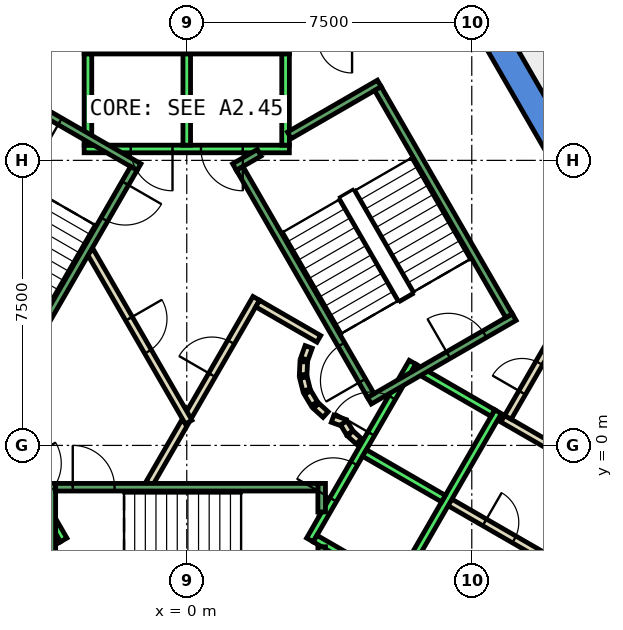
"""IFC4 building model, lengths in metres.
Left out: names, types, materials, properties, quantities, classifications, styles, units other than length and angle.
Written with IfcOpenShell. Run it as: python <this file> out.ifc"""

import sys

from ifc_helpers import new_model, si_unit, direction, frame, frame_2d, origin, place, context, subcontext, project, spatial, polyline, rectangle, outline, extrude, element, fill, save


model = new_model("IFC4")
c1 = context("Model", 3, precision=1e-05, world=origin(), true_north=direction((0.0, 1.0)))
c2 = subcontext(c1, "Body", "Model", "MODEL_VIEW")
j1 = project(units=[si_unit("LENGTHUNIT", "METRE"), si_unit("PLANEANGLEUNIT", "RADIAN")], contexts=[c1])
p1 = place(None, origin())
s1 = spatial("IfcSite", under=j1, at=p1, CompositionType="ELEMENT")
p2 = place(p1, origin())
s2 = spatial("IfcBuilding", under=s1, at=p2, CompositionType="ELEMENT")
p3 = place(p2, frame((0.0, 0.0, 219.2)))
s3 = spatial("IfcBuildingStorey", under=s2, at=p3, CompositionType="ELEMENT", Elevation=219.2)
p4 = place(p3, frame((0.0, 0.0, -0.4)))
e1 = element("IfcWall", 1, at=p4, inside=s3, PredefinedType="SHEAR", context=c2, shape_type="SweptSolid", body=[
    extrude(outline(polyline([(8.084, 11.498), (7.478, 11.148), (12.471, 2.5), (13.279, 2.5), (8.084, 11.498)])), origin(), (0.0, 0.0, 1.0), 4.2),
])
p5 = place(p3, frame((0.0, 0.0, -0.4)))
e2 = element("IfcWall", 2, at=p5, inside=s3, PredefinedType="SHEAR", context=c2, shape_type="SweptSolid", body=[
    extrude(outline(polyline([(6.64, -9.0), (13.279, 2.5), (12.471, 2.5), (6.235, -8.3), (6.64, -9.0)])), origin(), (0.0, 0.0, 1.0), 4.2),
])
p6 = place(p3, frame((6.841, -1.451, 0.0), z_axis=(0.0, 0.0, 1.0), x_axis=(0.866220623736, -0.499661716578, 0.0)))
e3 = element("IfcWall", 3, at=p6, inside=s3, PredefinedType="PARTITIONING", context=c2, shape_type="SweptSolid", body=[
    extrude(rectangle(XDim=2.9, YDim=0.2, at=frame_2d((1.45, 0.0))), origin(), (0.0, 0.0, 1.0), 3.8),
])
p7 = place(p6, frame((1.15, 0.0, 0.0)))
e4 = element("IfcOpeningElement", 4, at=p7, cuts=e3, PredefinedType="OPENING", context=c2, shape_type="SweptSolid", body=[
    extrude(rectangle(XDim=0.9, YDim=2.1, at=frame_2d((0.45, 1.05))), frame((0.0, 0.11, 0.0), z_axis=(0.0, -1.0, 0.0), x_axis=(1.0, 0.0, 0.0)), (0.0, 0.0, 1.0), 0.22),
])
p8 = place(p3, frame((10.653, -0.648, 0.0), z_axis=(0.0, 0.0, 1.0), x_axis=(-0.866036505625, 0.499980770555, 0.0)))
e5 = element("IfcWall", 5, at=p8, inside=s3, PredefinedType="PARTITIONING", context=c2, shape_type="SweptSolid", body=[
    extrude(rectangle(XDim=2.7, YDim=0.2, at=frame_2d((1.35, 0.0))), origin(), (0.0, 0.0, 1.0), 3.8),
])
p9 = place(p3, frame((8.451, 0.738, 0.0), z_axis=(0.0, 0.0, 1.0), x_axis=(0.499913221443, 0.866075499611, 0.0)))
e6 = element("IfcWall", 6, at=p9, inside=s3, PredefinedType="PARTITIONING", context=c2, shape_type="SweptSolid", body=[
    extrude(rectangle(XDim=2.4, YDim=0.2, at=frame_2d((1.2, 0.0))), origin(), (0.0, 0.0, 1.0), 3.8),
])
p10 = place(p9, frame((0.75, 0.0, 0.0)))
e7 = element("IfcOpeningElement", 7, at=p10, cuts=e6, PredefinedType="OPENING", context=c2, shape_type="SweptSolid", body=[
    extrude(rectangle(XDim=0.9, YDim=2.1, at=frame_2d((0.45, 1.05))), frame((0.0, 0.11, 0.0), z_axis=(0.0, -1.0, 0.0), x_axis=(1.0, 0.0, 0.0)), (0.0, 0.0, 1.0), 0.22),
])
p11 = place(p3, frame((-0.982, -1.0, 0.0), z_axis=(0.0, 0.0, 1.0), x_axis=(0.50024047865, 0.865886518847, 0.0)))
e8 = element("IfcWall", 8, at=p11, inside=s3, PredefinedType="PARTITIONING", context=c2, shape_type="SweptSolid", body=[
    extrude(rectangle(XDim=1.863, YDim=0.2, at=frame_2d((0.931, 0.0))), origin(), (0.0, 0.0, 1.0), 3.8),
])
p12 = place(p3, frame((0.05, 0.787, 0.0), z_axis=(0.0, 0.0, 1.0), x_axis=(0.499954076797, 0.866051915934, 0.0)))
e9 = element("IfcWall", 9, at=p12, inside=s3, PredefinedType="PARTITIONING", context=c2, shape_type="SweptSolid", body=[
    extrude(rectangle(XDim=3.558, YDim=0.2, at=frame_2d((1.779, 0.0))), origin(), (0.0, 0.0, 1.0), 3.8),
])
p13 = place(p12, frame((1.229, 0.0, 0.0)))
e10 = element("IfcOpeningElement", 10, at=p13, cuts=e9, PredefinedType="OPENING", context=c2, shape_type="SweptSolid", body=[
    extrude(rectangle(XDim=1.0, YDim=2.1, at=frame_2d((0.5, 1.05))), frame((0.0, 0.11, 0.0), z_axis=(0.0, -1.0, 0.0), x_axis=(1.0, 0.0, 0.0)), (0.0, 0.0, 1.0), 0.22),
])
p14 = place(p3, frame((1.866, 3.732, 0.0), z_axis=(0.0, 0.0, 1.0), x_axis=(0.866043361281, -0.499968895414, 0.0)))
e11 = element("IfcWall", 11, at=p14, inside=s3, PredefinedType="PARTITIONING", context=c2, shape_type="SweptSolid", body=[
    extrude(rectangle(XDim=1.858, YDim=0.2, at=frame_2d((0.929, 0.0))), origin(), (0.0, 0.0, 1.0), 3.8),
])
p15 = place(p3, frame((3.208, 2.592, 0.0), z_axis=(0.0, 0.0, 1.0), x_axis=(-0.337388820924, -0.941365382578, 0.0)))
e12 = element("IfcWall", 12, at=p15, inside=s3, PredefinedType="PARTITIONING", context=c2, shape_type="SweptSolid", body=[
    extrude(rectangle(XDim=0.338, YDim=0.2, at=frame_2d((0.169, 0.0))), origin(), (0.0, 0.0, 1.0), 3.8),
])
p16 = place(p3, frame((3.079, 2.199, 0.0), z_axis=(0.0, 0.0, 1.0), x_axis=(-0.047771483479, -0.998858290933, 0.0)))
e13 = element("IfcWall", 13, at=p16, inside=s3, PredefinedType="PARTITIONING", context=c2, shape_type="SweptSolid", body=[
    extrude(rectangle(XDim=0.337, YDim=0.2, at=frame_2d((0.169, 0.0))), origin(), (0.0, 0.0, 1.0), 3.8),
])
p17 = place(p3, frame((3.07, 1.786, 0.0), z_axis=(0.0, 0.0, 1.0), x_axis=(0.242705583207, -0.970099994784, 0.0)))
e14 = element("IfcWall", 14, at=p17, inside=s3, PredefinedType="PARTITIONING", context=c2, shape_type="SweptSolid", body=[
    extrude(rectangle(XDim=0.338, YDim=0.2, at=frame_2d((0.169, 0.0))), origin(), (0.0, 0.0, 1.0), 3.8),
])
for number, where, z_axis, x_axis in (
    (15, (3.182, 1.388, 0.0), (0.0, 0.0, 1.0), (0.512, -0.859, 0.0)),
    (16, (3.404, 1.039, 0.0), (0.0, 0.0, 1.0), (0.74, -0.672, 0.0)),
):
    element("IfcWall", number, at=place(p3, frame(where, z_axis=z_axis, x_axis=x_axis)), inside=s3, PredefinedType="PARTITIONING", context=c2, shape_type="SweptSolid", body=[
        extrude(rectangle(XDim=0.338, YDim=0.2, at=frame_2d((0.169, 0.0))), origin(), (0.0, 0.0, 1.0), 3.8),
    ])
p18 = place(p3, frame((3.838, 0.702, 0.0), z_axis=(0.0, 0.0, 1.0), x_axis=(0.941035081519, -0.338308993895, 0.0)))
e17 = element("IfcWall", 17, at=p18, inside=s3, PredefinedType="PARTITIONING", context=c2, shape_type="SweptSolid", body=[
    extrude(rectangle(XDim=0.337, YDim=0.2, at=frame_2d((0.168, 0.0))), origin(), (0.0, 0.0, 1.0), 3.8),
])
p19 = place(p3, frame((4.132, 0.593, 0.0), z_axis=(0.0, 0.0, 1.0), x_axis=(0.513561617048, -0.858052717201, 0.0)))
e18 = element("IfcWall", 18, at=p19, inside=s3, PredefinedType="PARTITIONING", context=c2, shape_type="SweptSolid", body=[
    extrude(rectangle(XDim=0.308, YDim=0.2, at=frame_2d((0.154, 0.0))), origin(), (0.0, 0.0, 1.0), 3.8),
])
p20 = place(p3, frame((4.301, 0.315, 0.0), z_axis=(0.0, 0.0, 1.0), x_axis=(0.741798017506, -0.670623367639, 0.0)))
e19 = element("IfcWall", 19, at=p20, inside=s3, PredefinedType="PARTITIONING", context=c2, shape_type="SweptSolid", body=[
    extrude(rectangle(XDim=0.309, YDim=0.2, at=frame_2d((0.154, 0.0))), origin(), (0.0, 0.0, 1.0), 3.8),
])
p21 = place(p3, frame((-2.54, 5.1, 0.0), z_axis=(0.0, 0.0, 1.0), x_axis=(0.499925051871, -0.866068670783, 0.0)))
e20 = element("IfcWall", 20, at=p21, inside=s3, PredefinedType="PARTITIONING", context=c2, shape_type="SweptSolid", body=[
    extrude(rectangle(XDim=5.181, YDim=0.2, at=frame_2d((2.59, 0.0))), origin(), (0.0, 0.0, 1.0), 3.8),
])
p22 = place(p21, frame((2.04, 0.0, 0.0)))
e21 = element("IfcOpeningElement", 21, at=p22, cuts=e20, PredefinedType="OPENING", context=c2, shape_type="SweptSolid", body=[
    extrude(rectangle(XDim=1.0, YDim=2.1, at=frame_2d((0.5, 1.05))), frame((0.0, 0.11, 0.0), z_axis=(0.0, -1.0, 0.0), x_axis=(1.0, 0.0, 0.0)), (0.0, 0.0, 1.0), 0.22),
])
p23 = place(p3, frame((2.7, 7.8, 0.0), z_axis=(0.0, 0.0, 1.0), x_axis=(-1.0, 0.0, 0.0)))
e22 = element("IfcWall", 22, at=p23, inside=s3, PredefinedType="STANDARD", context=c2, shape_type="SweptSolid", body=[
    extrude(rectangle(XDim=5.4, YDim=0.2, at=frame_2d((2.7, 0.0))), origin(), (0.0, 0.0, 1.0), 3.8),
])
p24 = place(p23, frame((1.225, 0.0, 0.0)))
e23 = element("IfcOpeningElement", 23, at=p24, cuts=e22, PredefinedType="OPENING", context=c2, shape_type="SweptSolid", body=[
    extrude(rectangle(XDim=1.1, YDim=2.1, at=frame_2d((0.55, 1.05))), frame((0.0, 0.11, 0.0), z_axis=(0.0, -1.0, 0.0), x_axis=(1.0, 0.0, 0.0)), (0.0, 0.0, 1.0), 0.22),
])
p25 = place(p23, frame((3.075, 0.0, 0.0)))
e24 = element("IfcOpeningElement", 24, at=p25, cuts=e22, PredefinedType="OPENING", context=c2, shape_type="SweptSolid", body=[
    extrude(rectangle(XDim=1.1, YDim=2.1, at=frame_2d((0.55, 1.05))), frame((0.0, 0.11, 0.0), z_axis=(0.0, -1.0, 0.0), x_axis=(1.0, 0.0, 0.0)), (0.0, 0.0, 1.0), 0.22),
])
p26 = place(p3, frame((2.7, 10.4, 0.0), z_axis=(0.0, 0.0, 1.0), x_axis=(-1.0, 0.0, 0.0)))
e25 = element("IfcWall", 25, at=p26, inside=s3, PredefinedType="STANDARD", context=c2, shape_type="SweptSolid", body=[
    extrude(rectangle(XDim=5.4, YDim=0.2, at=frame_2d((2.7, 0.0))), origin(), (0.0, 0.0, 1.0), 3.8),
])
for number, where, z_axis, x_axis in (
    (26, (2.6, 7.9, 0.0), (0.0, 0.0, 1.0), (0.0, 1.0, 0.0)),
    (27, (0.0, 7.9, 0.0), (0.0, 0.0, 1.0), (0.0, 1.0, 0.0)),
    (28, (-2.6, 7.9, 0.0), (0.0, 0.0, 1.0), (0.0, 1.0, 0.0)),
):
    element("IfcWall", number, at=place(p3, frame(where, z_axis=z_axis, x_axis=x_axis)), inside=s3, PredefinedType="STANDARD", context=c2, shape_type="SweptSolid", body=[
        extrude(rectangle(XDim=2.4, YDim=0.2, at=frame_2d((1.2, 0.0))), origin(), (0.0, 0.0, 1.0), 3.8),
    ])
p27 = place(p3, frame((-5.94, 2.188, 0.0), z_axis=(0.0, 0.0, 1.0), x_axis=(0.500034260056, -0.866005622828, 0.0)))
e29 = element("IfcWall", 29, at=p27, inside=s3, PredefinedType="STANDARD", context=c2, shape_type="SweptSolid", body=[
    extrude(rectangle(XDim=5.399, YDim=0.2, at=frame_2d((2.7, 0.0))), origin(), (0.0, 0.0, 1.0), 3.8),
])
p28 = place(p27, frame((3.075, 0.0, 0.0)))
e30 = element("IfcOpeningElement", 30, at=p28, cuts=e29, PredefinedType="OPENING", context=c2, shape_type="SweptSolid", body=[
    extrude(rectangle(XDim=1.1, YDim=2.1, at=frame_2d((0.55, 1.05))), frame((0.0, 0.11, 0.0), z_axis=(0.0, -1.0, 0.0), x_axis=(1.0, 0.0, 0.0)), (0.0, 0.0, 1.0), 0.22),
])
p29 = place(p27, frame((1.225, 0.0, 0.0)))
e31 = element("IfcOpeningElement", 31, at=p29, cuts=e29, PredefinedType="OPENING", context=c2, shape_type="SweptSolid", body=[
    extrude(rectangle(XDim=1.1, YDim=2.1, at=frame_2d((0.55, 1.05))), frame((0.0, 0.11, 0.0), z_axis=(0.0, -1.0, 0.0), x_axis=(1.0, 0.0, 0.0)), (0.0, 0.0, 1.0), 0.22),
])
p30 = place(p3, frame((-3.377, -2.452, 0.0), z_axis=(0.0, 0.0, 1.0), x_axis=(-0.865955154139, -0.50012165622, 0.0)))
e32 = element("IfcWall", 32, at=p30, inside=s3, PredefinedType="STANDARD", context=c2, shape_type="SweptSolid", body=[
    extrude(rectangle(XDim=2.4, YDim=0.2, at=frame_2d((1.2, 0.0))), origin(), (0.0, 0.0, 1.0), 3.8),
])
p31 = place(p3, frame((3.24, -2.488, 0.0), z_axis=(0.0, 0.0, 1.0), x_axis=(0.500034260056, 0.866005622828, 0.0)))
e33 = element("IfcWall", 33, at=p31, inside=s3, PredefinedType="STANDARD", context=c2, shape_type="SweptSolid", body=[
    extrude(rectangle(XDim=5.399, YDim=0.2, at=frame_2d((2.7, 0.0))), origin(), (0.0, 0.0, 1.0), 3.8),
])
p32 = place(p31, frame((3.225, 0.0, 0.0)))
e34 = element("IfcOpeningElement", 34, at=p32, cuts=e33, PredefinedType="OPENING", context=c2, shape_type="SweptSolid", body=[
    extrude(rectangle(XDim=1.1, YDim=2.1, at=frame_2d((0.55, 1.05))), frame((0.0, 0.11, 0.0), z_axis=(0.0, -1.0, 0.0), x_axis=(1.0, 0.0, 0.0)), (0.0, 0.0, 1.0), 0.22),
])
p33 = place(p31, frame((1.225, 0.0, 0.0)))
e35 = element("IfcOpeningElement", 35, at=p33, cuts=e33, PredefinedType="OPENING", context=c2, shape_type="SweptSolid", body=[
    extrude(rectangle(XDim=1.1, YDim=2.1, at=frame_2d((0.55, 1.05))), frame((0.0, 0.11, 0.0), z_axis=(0.0, -1.0, 0.0), x_axis=(1.0, 0.0, 0.0)), (0.0, 0.0, 1.0), 0.22),
])
p34 = place(p3, frame((5.492, -3.788, 0.0), z_axis=(0.0, 0.0, 1.0), x_axis=(0.500034260056, 0.866005622828, 0.0)))
e36 = element("IfcWall", 36, at=p34, inside=s3, PredefinedType="STANDARD", context=c2, shape_type="SweptSolid", body=[
    extrude(rectangle(XDim=5.399, YDim=0.2, at=frame_2d((2.7, 0.0))), origin(), (0.0, 0.0, 1.0), 3.8),
])
p35 = place(p3, frame((3.377, -2.452, 0.0), z_axis=(0.0, 0.0, 1.0), x_axis=(0.865955154139, -0.50012165622, 0.0)))
e37 = element("IfcWall", 37, at=p35, inside=s3, PredefinedType="STANDARD", context=c2, shape_type="SweptSolid", body=[
    extrude(rectangle(XDim=2.4, YDim=0.2, at=frame_2d((1.2, 0.0))), origin(), (0.0, 0.0, 1.0), 3.8),
])
for number, where, z_axis, x_axis in (
    (38, (4.677, -0.2, 0.0), (0.0, 0.0, 1.0), (0.866, -0.5, 0.0)),
    (39, (5.977, 2.052, 0.0), (0.0, 0.0, 1.0), (0.866, -0.5, 0.0)),
):
    element("IfcWall", number, at=place(p3, frame(where, z_axis=z_axis, x_axis=x_axis)), inside=s3, PredefinedType="STANDARD", context=c2, shape_type="SweptSolid", body=[
        extrude(rectangle(XDim=2.399, YDim=0.2, at=frame_2d((1.2, 0.0))), origin(), (0.0, 0.0, 1.0), 3.8),
    ])
p36 = place(p3, frame((-3.55, -1.0, 0.0), z_axis=(0.0, 0.0, 1.0), x_axis=(0.0, -1.0, 0.0)))
e40 = element("IfcWall", 40, at=p36, inside=s3, PredefinedType="STANDARD", context=c2, shape_type="SweptSolid", body=[
    extrude(rectangle(XDim=4.4, YDim=0.2, at=frame_2d((2.2, 0.0))), origin(), (0.0, 0.0, 1.0), 3.8),
])
p37 = place(p36, frame((2.4, 0.0, 0.0)))
e41 = element("IfcOpeningElement", 41, at=p37, cuts=e40, PredefinedType="OPENING", context=c2, shape_type="SweptSolid", body=[
    extrude(rectangle(XDim=1.1, YDim=2.2, at=frame_2d((0.55, 1.1))), frame((0.0, 0.11, 0.0), z_axis=(0.0, -1.0, 0.0), x_axis=(1.0, 0.0, 0.0)), (0.0, 0.0, 1.0), 0.22),
])
p38 = place(p3, frame((3.55, -2.667, 0.0), z_axis=(0.0, 0.0, 1.0), x_axis=(0.0, -1.0, 0.0)))
e42 = element("IfcWall", 42, at=p38, inside=s3, PredefinedType="STANDARD", context=c2, shape_type="SweptSolid", body=[
    extrude(rectangle(XDim=2.733, YDim=0.2, at=frame_2d((1.366, 0.0))), origin(), (0.0, 0.0, 1.0), 3.8),
])
p39 = place(p3, frame((3.55, -1.0, 0.0), z_axis=(0.0, 0.0, 1.0), x_axis=(0.0, -1.0, 0.0)))
e43 = element("IfcWall", 43, at=p39, inside=s3, PredefinedType="STANDARD", context=c2, shape_type="SweptSolid", body=[
    extrude(rectangle(XDim=0.751, YDim=0.2, at=frame_2d((0.375, 0.0))), origin(), (0.0, 0.0, 1.0), 3.8),
])
p40 = place(p3, frame((-3.45, -1.1, 0.0), z_axis=(0.0, 0.0, 1.0), x_axis=(1.0, 0.0, 0.0)))
e44 = element("IfcWall", 44, at=p40, inside=s3, PredefinedType="STANDARD", context=c2, shape_type="SweptSolid", body=[
    extrude(rectangle(XDim=6.9, YDim=0.2, at=frame_2d((3.45, 0.0))), origin(), (0.0, 0.0, 1.0), 3.8),
])
p41 = place(p40, frame((0.45, 0.0, 0.0)))
e45 = element("IfcOpeningElement", 45, at=p41, cuts=e44, PredefinedType="OPENING", context=c2, shape_type="SweptSolid", body=[
    extrude(rectangle(XDim=1.1, YDim=2.2, at=frame_2d((0.55, 1.1))), frame((0.0, 0.11, 0.0), z_axis=(0.0, -1.0, 0.0), x_axis=(1.0, 0.0, 0.0)), (0.0, 0.0, 1.0), 0.22),
])
p42 = place(p3, frame((4.806, 1.176, 0.0), z_axis=(0.0, 0.0, 1.0), x_axis=(0.866059941101, 0.499940174841, 0.0)))
e46 = element("IfcWall", 46, at=p42, inside=s3, PredefinedType="STANDARD", context=c2, shape_type="SweptSolid", body=[
    extrude(rectangle(XDim=4.4, YDim=0.2, at=frame_2d((2.2, 0.0))), origin(), (0.0, 0.0, 1.0), 3.8),
])
p43 = place(p42, frame((2.4, 0.0, 0.0)))
e47 = element("IfcOpeningElement", 47, at=p43, cuts=e46, PredefinedType="OPENING", context=c2, shape_type="SweptSolid", body=[
    extrude(rectangle(XDim=1.1, YDim=2.2, at=frame_2d((0.55, 1.1))), frame((0.0, 0.11, 0.0), z_axis=(0.0, -1.0, 0.0), x_axis=(1.0, 0.0, 0.0)), (0.0, 0.0, 1.0), 0.22),
])
p44 = place(p3, frame((2.7, 8.158, 0.0), z_axis=(0.0, 0.0, 1.0), x_axis=(0.86611865017, 0.499838457731, 0.0)))
e48 = element("IfcWall", 48, at=p44, inside=s3, PredefinedType="STANDARD", context=c2, shape_type="SweptSolid", body=[
    extrude(rectangle(XDim=2.733, YDim=0.2, at=frame_2d((1.366, 0.0))), origin(), (0.0, 0.0, 1.0), 3.8),
])
p45 = place(p3, frame((1.256, 7.324, 0.0), z_axis=(0.0, 0.0, 1.0), x_axis=(0.865915093549, 0.500191014278, 0.0)))
e49 = element("IfcWall", 49, at=p45, inside=s3, PredefinedType="STANDARD", context=c2, shape_type="SweptSolid", body=[
    extrude(rectangle(XDim=0.752, YDim=0.2, at=frame_2d((0.376, 0.0))), origin(), (0.0, 0.0, 1.0), 3.8),
])
p46 = place(p3, frame((4.843, 1.312, 0.0), z_axis=(0.0, 0.0, 1.0), x_axis=(-0.499963383562, 0.866046543262, 0.0)))
e50 = element("IfcWall", 50, at=p46, inside=s3, PredefinedType="STANDARD", context=c2, shape_type="SweptSolid", body=[
    extrude(rectangle(XDim=6.9, YDim=0.2, at=frame_2d((3.45, 0.0))), origin(), (0.0, 0.0, 1.0), 3.8),
])
p47 = place(p46, frame((0.45, 0.0, 0.0)))
e51 = element("IfcOpeningElement", 51, at=p47, cuts=e50, PredefinedType="OPENING", context=c2, shape_type="SweptSolid", body=[
    extrude(rectangle(XDim=1.1, YDim=2.2, at=frame_2d((0.55, 1.1))), frame((0.0, 0.11, 0.0), z_axis=(0.0, -1.0, 0.0), x_axis=(1.0, 0.0, 0.0)), (0.0, 0.0, 1.0), 0.22),
])
p48 = place(p3, frame((8.48, 3.412, 0.0), z_axis=(0.0, 0.0, 1.0), x_axis=(-0.499978703459, 0.866037698999, 0.0)))
e52 = element("IfcWall", 52, at=p48, inside=s3, PredefinedType="STANDARD", context=c2, shape_type="SweptSolid", body=[
    extrude(rectangle(XDim=6.9, YDim=0.2, at=frame_2d((3.45, 0.0))), origin(), (0.0, 0.0, 1.0), 3.8),
])
p49 = place(p3, frame((-1.256, 7.324, 0.0), z_axis=(0.0, 0.0, 1.0), x_axis=(-0.866046073146, 0.499964197906, 0.0)))
e53 = element("IfcWall", 53, at=p49, inside=s3, PredefinedType="STANDARD", context=c2, shape_type="SweptSolid", body=[
    extrude(rectangle(XDim=4.4, YDim=0.2, at=frame_2d((2.2, 0.0))), origin(), (0.0, 0.0, 1.0), 3.8),
])
p50 = place(p49, frame((2.4, 0.0, 0.0)))
e54 = element("IfcOpeningElement", 54, at=p50, cuts=e53, PredefinedType="OPENING", context=c2, shape_type="SweptSolid", body=[
    extrude(rectangle(XDim=1.1, YDim=2.2, at=frame_2d((0.55, 1.1))), frame((0.0, 0.11, 0.0), z_axis=(0.0, -1.0, 0.0), x_axis=(1.0, 0.0, 0.0)), (0.0, 0.0, 1.0), 0.22),
])
p51 = place(p3, frame((-1.393, 7.288, 0.0), z_axis=(0.0, 0.0, 1.0), x_axis=(-0.499963383562, -0.866046543262, 0.0)))
e55 = element("IfcWall", 55, at=p51, inside=s3, PredefinedType="STANDARD", context=c2, shape_type="SweptSolid", body=[
    extrude(rectangle(XDim=6.9, YDim=0.2, at=frame_2d((3.45, 0.0))), origin(), (0.0, 0.0, 1.0), 3.8),
])
p52 = place(p51, frame((0.45, 0.0, 0.0)))
e56 = element("IfcOpeningElement", 56, at=p52, cuts=e55, PredefinedType="OPENING", context=c2, shape_type="SweptSolid", body=[
    extrude(rectangle(XDim=1.1, YDim=2.2, at=frame_2d((0.55, 1.1))), frame((0.0, 0.11, 0.0), z_axis=(0.0, -1.0, 0.0), x_axis=(1.0, 0.0, 0.0)), (0.0, 0.0, 1.0), 0.22),
])
p53 = place(p13, origin())
e57 = element("IfcDoor", 57, at=p53, inside=s3, OperationType="SINGLE_SWING_RIGHT", PredefinedType="DOOR", context=c2, shape_type="SweptSolid", body=[
    extrude(rectangle(XDim=1.0, YDim=2.1, at=frame_2d((0.5, 1.05))), frame((0.0, 0.025, 0.0), z_axis=(0.0, -1.0, 0.0), x_axis=(1.0, 0.0, 0.0)), (0.0, 0.0, 1.0), 0.05),
])
fill(e10, e57)
p54 = place(p22, origin())
e58 = element("IfcDoor", 58, at=p54, inside=s3, OperationType="SINGLE_SWING_RIGHT", PredefinedType="DOOR", context=c2, shape_type="SweptSolid", body=[
    extrude(rectangle(XDim=1.0, YDim=2.1, at=frame_2d((0.5, 1.05))), frame((0.0, 0.025, 0.0), z_axis=(0.0, -1.0, 0.0), x_axis=(1.0, 0.0, 0.0)), (0.0, 0.0, 1.0), 0.05),
])
fill(e21, e58)
p55 = place(p7, origin())
e59 = element("IfcDoor", 59, at=p55, inside=s3, OperationType="SINGLE_SWING_LEFT", PredefinedType="DOOR", context=c2, shape_type="SweptSolid", body=[
    extrude(rectangle(XDim=0.9, YDim=2.1, at=frame_2d((0.45, 1.05))), frame((0.0, 0.025, 0.0), z_axis=(0.0, -1.0, 0.0), x_axis=(1.0, 0.0, 0.0)), (0.0, 0.0, 1.0), 0.05),
])
fill(e4, e59)
p56 = place(p10, origin())
e60 = element("IfcDoor", 60, at=p56, inside=s3, OperationType="SINGLE_SWING_LEFT", PredefinedType="DOOR", context=c2, shape_type="SweptSolid", body=[
    extrude(rectangle(XDim=0.9, YDim=2.1, at=frame_2d((0.45, 1.05))), frame((0.0, 0.025, 0.0), z_axis=(0.0, -1.0, 0.0), x_axis=(1.0, 0.0, 0.0)), (0.0, 0.0, 1.0), 0.05),
])
fill(e7, e60)
p57 = place(p24, origin())
e61 = element("IfcDoor", 61, at=p57, inside=s3, OperationType="SLIDING_TO_LEFT", PredefinedType="DOOR", context=c2, shape_type="SweptSolid", body=[
    extrude(rectangle(XDim=1.1, YDim=2.1, at=frame_2d((0.55, 1.05))), frame((0.0, 0.025, 0.0), z_axis=(0.0, -1.0, 0.0), x_axis=(1.0, 0.0, 0.0)), (0.0, 0.0, 1.0), 0.05),
])
fill(e23, e61)
p58 = place(p25, origin())
e62 = element("IfcDoor", 62, at=p58, inside=s3, OperationType="SLIDING_TO_LEFT", PredefinedType="DOOR", context=c2, shape_type="SweptSolid", body=[
    extrude(rectangle(XDim=1.1, YDim=2.1, at=frame_2d((0.55, 1.05))), frame((0.0, 0.025, 0.0), z_axis=(0.0, -1.0, 0.0), x_axis=(1.0, 0.0, 0.0)), (0.0, 0.0, 1.0), 0.05),
])
fill(e24, e62)
p59 = place(p32, origin())
e63 = element("IfcDoor", 63, at=p59, inside=s3, OperationType="SLIDING_TO_LEFT", PredefinedType="DOOR", context=c2, shape_type="SweptSolid", body=[
    extrude(rectangle(XDim=1.1, YDim=2.1, at=frame_2d((0.55, 1.05))), frame((0.0, 0.025, 0.0), z_axis=(0.0, -1.0, 0.0), x_axis=(1.0, 0.0, 0.0)), (0.0, 0.0, 1.0), 0.05),
])
fill(e34, e63)
p60 = place(p33, origin())
e64 = element("IfcDoor", 64, at=p60, inside=s3, OperationType="SLIDING_TO_LEFT", PredefinedType="DOOR", context=c2, shape_type="SweptSolid", body=[
    extrude(rectangle(XDim=1.1, YDim=2.1, at=frame_2d((0.55, 1.05))), frame((0.0, 0.025, 0.0), z_axis=(0.0, -1.0, 0.0), x_axis=(1.0, 0.0, 0.0)), (0.0, 0.0, 1.0), 0.05),
])
fill(e35, e64)
p61 = place(p41, origin())
e65 = element("IfcDoor", 65, at=p61, inside=s3, OperationType="SINGLE_SWING_LEFT", PredefinedType="DOOR", context=c2, shape_type="SweptSolid", body=[
    extrude(rectangle(XDim=1.1, YDim=2.2, at=frame_2d((0.55, 1.1))), frame((0.0, 0.025, 0.0), z_axis=(0.0, -1.0, 0.0), x_axis=(1.0, 0.0, 0.0)), (0.0, 0.0, 1.0), 0.05),
])
fill(e45, e65)
p62 = place(p47, origin())
e66 = element("IfcDoor", 66, at=p62, inside=s3, OperationType="SINGLE_SWING_LEFT", PredefinedType="DOOR", context=c2, shape_type="SweptSolid", body=[
    extrude(rectangle(XDim=1.1, YDim=2.2, at=frame_2d((0.55, 1.1))), frame((0.0, 0.025, 0.0), z_axis=(0.0, -1.0, 0.0), x_axis=(1.0, 0.0, 0.0)), (0.0, 0.0, 1.0), 0.05),
])
fill(e51, e66)
p63 = place(p43, origin())
e67 = element("IfcDoor", 67, at=p63, inside=s3, OperationType="SINGLE_SWING_LEFT", PredefinedType="DOOR", context=c2, shape_type="SweptSolid", body=[
    extrude(rectangle(XDim=1.1, YDim=2.2, at=frame_2d((0.55, 1.1))), frame((0.0, 0.025, 0.0), z_axis=(0.0, -1.0, 0.0), x_axis=(1.0, 0.0, 0.0)), (0.0, 0.0, 1.0), 0.05),
])
fill(e47, e67)
p64 = place(p52, origin())
e68 = element("IfcDoor", 68, at=p64, inside=s3, OperationType="SINGLE_SWING_LEFT", PredefinedType="DOOR", context=c2, shape_type="SweptSolid", body=[
    extrude(rectangle(XDim=1.1, YDim=2.2, at=frame_2d((0.55, 1.1))), frame((0.0, 0.025, 0.0), z_axis=(0.0, -1.0, 0.0), x_axis=(1.0, 0.0, 0.0)), (0.0, 0.0, 1.0), 0.05),
])
fill(e56, e68)
p65 = place(p50, origin())
e69 = element("IfcDoor", 69, at=p65, inside=s3, OperationType="SINGLE_SWING_LEFT", PredefinedType="DOOR", context=c2, shape_type="SweptSolid", body=[
    extrude(rectangle(XDim=1.1, YDim=2.2, at=frame_2d((0.55, 1.1))), frame((0.0, 0.025, 0.0), z_axis=(0.0, -1.0, 0.0), x_axis=(1.0, 0.0, 0.0)), (0.0, 0.0, 1.0), 0.05),
])
fill(e54, e69)
save(model, sys.argv[1])
